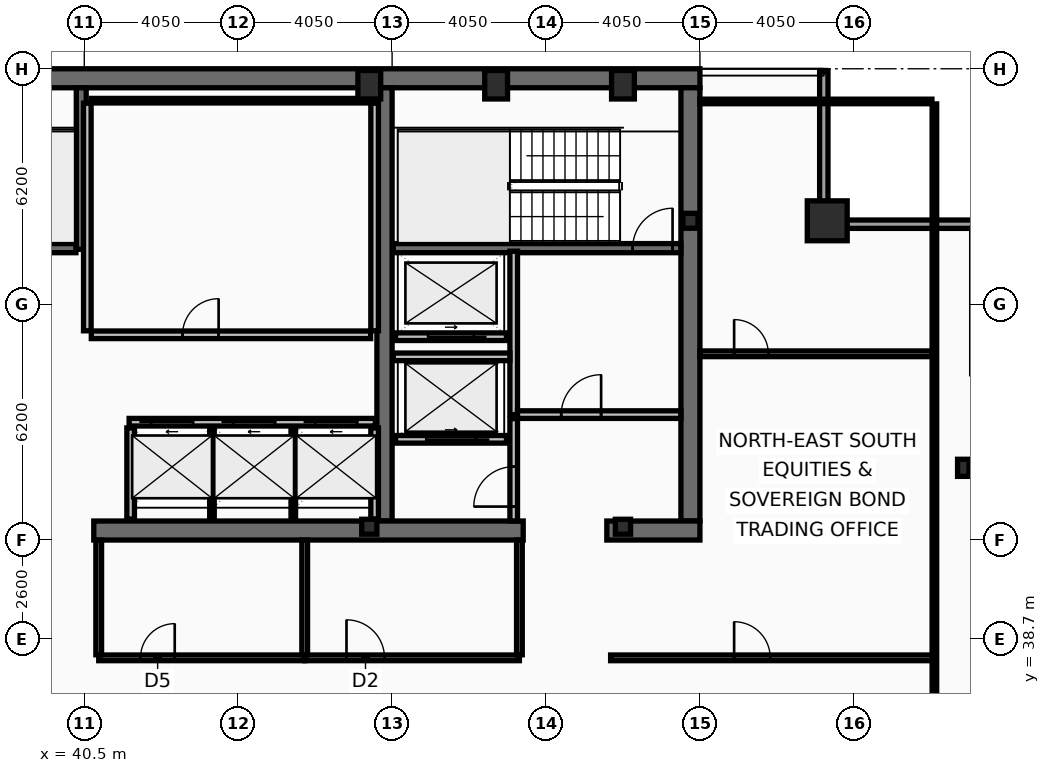
"""IFC4 building model, lengths in metres.
Left out: names, types, materials, properties, quantities, classifications, styles, units other than length and angle.
Written with IfcOpenShell. Run it as: python <this file> out.ifc"""

import sys

from ifc_helpers import new_model, si_unit, direction, frame, frame_2d, origin, origin_2d, place, context, subcontext, project, spatial, rectangle, hollow_rectangle, i_section, extrude, element, fill, save


model = new_model("IFC4")
c1 = context("Model", 3, precision=1e-05, world=origin(), true_north=direction((0.0, 1.0)))
c2 = subcontext(c1, "Body", "Model", "MODEL_VIEW")
j1 = project(units=[si_unit("LENGTHUNIT", "METRE"), si_unit("PLANEANGLEUNIT", "RADIAN")], contexts=[c1])
p1 = place(None, origin())
s1 = spatial("IfcSite", under=j1, at=p1, CompositionType="ELEMENT")
p2 = place(p1, origin())
s2 = spatial("IfcBuilding", under=s1, at=p2, CompositionType="ELEMENT")
p3 = place(p2, frame((0.0, 0.0, 284.2)))
s3 = spatial("IfcBuildingStorey", under=s2, at=p3, CompositionType="ELEMENT", Elevation=284.2)
p4 = place(p3, frame((16.2, 53.45, 0.0), z_axis=(0.0, 0.0, 1.0), x_axis=(1.0, 0.0, 0.0)))
e1 = element("IfcWall", 1, at=p4, inside=s3, PredefinedType="SHEAR", context=c2, shape_type="SweptSolid", body=[
    extrude(rectangle(XDim=40.5, YDim=0.5, at=frame_2d((20.25, 0.0))), origin(), (0.0, 0.0, 1.0), 3.44),
])
p5 = place(p3, frame((56.45, 53.2, 0.0), z_axis=(0.0, 0.0, 1.0), x_axis=(0.0, -1.0, 0.0)))
e2 = element("IfcWall", 2, at=p5, inside=s3, PredefinedType="SHEAR", context=c2, shape_type="SweptSolid", body=[
    extrude(rectangle(XDim=11.4, YDim=0.5, at=frame_2d((5.7, 0.0))), origin(), (0.0, 0.0, 1.0), 3.44),
])
p6 = place(p3, frame((48.4, 41.8, 0.0), z_axis=(0.0, 0.0, 1.0), x_axis=(0.0, 1.0, 0.0)))
e3 = element("IfcWall", 3, at=p6, inside=s3, PredefinedType="SHEAR", context=c2, shape_type="SweptSolid", body=[
    extrude(rectangle(XDim=11.4, YDim=0.4, at=frame_2d((5.7, 0.0))), origin(), (0.0, 0.0, 1.0), 3.44),
])
p7 = place(p3, frame((52.05, 41.55, 0.0), z_axis=(0.0, 0.0, 1.0), x_axis=(-1.0, 0.0, 0.0)))
e4 = element("IfcWall", 4, at=p7, inside=s3, PredefinedType="SHEAR", context=c2, shape_type="SweptSolid", body=[
    extrude(rectangle(XDim=11.3, YDim=0.5, at=frame_2d((5.65, 0.0))), origin(), (0.0, 0.0, 1.0), 3.44),
])
p8 = place(p3, frame((56.7, 41.55, 0.0), z_axis=(0.0, 0.0, 1.0), x_axis=(-1.0, 0.0, 0.0)))
e5 = element("IfcWall", 5, at=p8, inside=s3, PredefinedType="SHEAR", context=c2, shape_type="SweptSolid", body=[
    extrude(rectangle(XDim=2.45, YDim=0.5, at=frame_2d((1.225, 0.0))), origin(), (0.0, 0.0, 1.0), 3.44),
])
p9 = place(p3, frame((40.42, 48.95, 0.0), z_axis=(0.0, 0.0, 1.0), x_axis=(0.0, 1.0, 0.0)))
e6 = element("IfcWall", 6, at=p9, inside=s3, PredefinedType="SHEAR", context=c2, shape_type="SweptSolid", body=[
    extrude(rectangle(XDim=4.25, YDim=0.26, at=frame_2d((2.125, 0.0))), origin(), (0.0, 0.0, 1.0), 3.44),
])
p10 = place(p3, frame((48.63, 48.98, 0.0), z_axis=(0.0, 0.0, 1.0), x_axis=(1.0, 0.0, 0.0)))
e7 = element("IfcWall", 7, at=p10, inside=s3, PredefinedType="SHEAR", context=c2, shape_type="SweptSolid", body=[
    extrude(rectangle(XDim=7.57, YDim=0.24, at=frame_2d((3.785, 0.0))), origin(), (0.0, 0.0, 1.0), 3.44),
])
p11 = place(p10, frame((6.3, 0.0, 0.0)))
e8 = element("IfcOpeningElement", 8, at=p11, cuts=e7, PredefinedType="OPENING", context=c2, shape_type="SweptSolid", body=[
    extrude(rectangle(XDim=1.05, YDim=2.15, at=frame_2d((0.525, 1.075))), frame((0.0, 0.13, 0.0), z_axis=(0.0, -1.0, 0.0), x_axis=(1.0, 0.0, 0.0)), (0.0, 0.0, 1.0), 0.26),
])
p12 = place(p3, frame((32.72, 48.98, 0.0), z_axis=(0.0, 0.0, 1.0), x_axis=(1.0, 0.0, 0.0)))
e9 = element("IfcWall", 9, at=p12, inside=s3, PredefinedType="SHEAR", context=c2, shape_type="SweptSolid", body=[
    extrude(rectangle(XDim=7.56, YDim=0.24, at=frame_2d((3.78, 0.0))), origin(), (0.0, 0.0, 1.0), 3.44),
])
p13 = place(p12, frame((0.22, 0.0, 0.0)))
e10 = element("IfcOpeningElement", 10, at=p13, cuts=e9, PredefinedType="OPENING", context=c2, shape_type="SweptSolid", body=[
    extrude(rectangle(XDim=1.05, YDim=2.15, at=frame_2d((0.525, 1.075))), frame((0.0, 0.13, 0.0), z_axis=(0.0, -1.0, 0.0), x_axis=(1.0, 0.0, 0.0)), (0.0, 0.0, 1.0), 0.26),
])
p14 = place(p3, frame((60.05, 49.7, 0.0), z_axis=(0.0, 0.0, 1.0), x_axis=(1.0, 0.0, 0.0)))
e11 = element("IfcColumn", 11, at=p14, inside=s3, PredefinedType="COLUMN", context=c2, shape_type="SweptSolid", body=[
    extrude(hollow_rectangle(XDim=1.05, YDim=1.05, WallThickness=0.055, at=origin_2d()), origin(), (0.0, 0.0, 1.0), 3.6),
])
for number, where, z_axis, x_axis in (
    (12, (48.0, 53.28, 0.0), (0.0, 0.0, 1.0), (1.0, 0.0, 0.0)),
    (13, (51.337, 53.28, 0.0), (0.0, 0.0, 1.0), (1.0, 0.0, 0.0)),
    (14, (54.675, 53.28, 0.0), (0.0, 0.0, 1.0), (1.0, 0.0, 0.0)),
):
    element("IfcColumn", number, at=place(p3, frame(where, z_axis=z_axis, x_axis=x_axis)), inside=s3, PredefinedType="COLUMN", context=c2, shape_type="SweptSolid", body=[
        extrude(hollow_rectangle(XDim=0.6, YDim=0.75, WallThickness=0.045, at=origin_2d()), origin(), (0.0, 0.0, 1.0), 3.6),
    ])
p15 = place(p3, frame((63.63, 43.2, 0.0), z_axis=(0.0, 0.0, 1.0), x_axis=(1.0, 0.0, 0.0)))
e15 = element("IfcColumn", 15, at=p15, inside=s3, PredefinedType="COLUMN", context=c2, shape_type="SweptSolid", body=[
    extrude(i_section(OverallWidth=0.3, OverallDepth=0.45, WebThickness=0.014, FlangeThickness=0.026, at=origin_2d()), origin(), (0.0, 0.0, 1.0), 3.6),
])
for number, where, z_axis, x_axis in (
    (16, (56.45, 49.7, 0.0), (0.0, 0.0, 1.0), (1.0, 0.0, 0.0)),
    (17, (48.0, 41.65, 0.0), (0.0, 0.0, 1.0), (1.0, 0.0, 0.0)),
    (18, (54.675, 41.65, 0.0), (0.0, 0.0, 1.0), (1.0, 0.0, 0.0)),
):
    element("IfcColumn", number, at=place(p3, frame(where, z_axis=z_axis, x_axis=x_axis)), inside=s3, PredefinedType="COLUMN", context=c2, shape_type="SweptSolid", body=[
        extrude(i_section(OverallWidth=0.399, OverallDepth=0.393, WebThickness=0.023, FlangeThickness=0.037, at=origin_2d()), origin(), (0.0, 0.0, 1.0), 3.6),
    ])
p16 = place(p3, frame((59.96, 53.63, 0.0), z_axis=(0.0, 0.0, 1.0), x_axis=(0.0, -1.0, 0.0)))
e19 = element("IfcWall", 19, at=p16, inside=s3, PredefinedType="SOLIDWALL", context=c2, shape_type="SweptSolid", body=[
    extrude(rectangle(XDim=3.91, YDim=0.22, at=frame_2d((1.955, 0.0))), origin(), (0.0, 0.0, 1.0), 2.88),
])
p17 = place(p3, frame((59.85, 49.61, 0.0), z_axis=(0.0, 0.0, 1.0), x_axis=(1.0, 0.0, 0.0)))
e20 = element("IfcWall", 20, at=p17, inside=s3, PredefinedType="SOLIDWALL", context=c2, shape_type="SweptSolid", body=[
    extrude(rectangle(XDim=4.22, YDim=0.22, at=frame_2d((2.11, 0.0))), origin(), (0.0, 0.0, 1.0), 2.88),
])
p18 = place(p3, frame((41.68, 44.4, 0.0), z_axis=(0.0, 0.0, 1.0), x_axis=(1.0, 0.0, 0.0)))
e21 = element("IfcWall", 21, at=p18, inside=s3, PredefinedType="PARTITIONING", context=c2, shape_type="SweptSolid", body=[
    extrude(rectangle(XDim=6.48, YDim=0.2, at=frame_2d((3.24, 0.0))), origin(), (0.0, 0.0, 1.0), 3.44),
])
p19 = place(p18, frame((0.58, 0.0, 0.0)))
e22 = element("IfcOpeningElement", 22, at=p19, cuts=e21, PredefinedType="OPENING", context=c2, shape_type="SweptSolid", body=[
    extrude(rectangle(XDim=1.1, YDim=2.18, at=frame_2d((0.55, 1.09))), frame((0.0, 0.11, 0.0), z_axis=(0.0, -1.0, 0.0), x_axis=(1.0, 0.0, 0.0)), (0.0, 0.0, 1.0), 0.22),
])
p20 = place(p18, frame((2.74, 0.0, 0.0)))
e23 = element("IfcOpeningElement", 23, at=p20, cuts=e21, PredefinedType="OPENING", context=c2, shape_type="SweptSolid", body=[
    extrude(rectangle(XDim=1.1, YDim=2.18, at=frame_2d((0.55, 1.09))), frame((0.0, 0.11, 0.0), z_axis=(0.0, -1.0, 0.0), x_axis=(1.0, 0.0, 0.0)), (0.0, 0.0, 1.0), 0.22),
])
p21 = place(p18, frame((4.9, 0.0, 0.0)))
e24 = element("IfcOpeningElement", 24, at=p21, cuts=e21, PredefinedType="OPENING", context=c2, shape_type="SweptSolid", body=[
    extrude(rectangle(XDim=1.1, YDim=2.18, at=frame_2d((0.55, 1.09))), frame((0.0, 0.11, 0.0), z_axis=(0.0, -1.0, 0.0), x_axis=(1.0, 0.0, 0.0)), (0.0, 0.0, 1.0), 0.22),
])
p22 = place(p3, frame((51.61, 43.95, 0.0), z_axis=(0.0, 0.0, 1.0), x_axis=(-1.0, 0.0, 0.0)))
e25 = element("IfcWall", 25, at=p22, inside=s3, PredefinedType="PARTITIONING", context=c2, shape_type="SweptSolid", body=[
    extrude(rectangle(XDim=2.92, YDim=0.2, at=frame_2d((1.46, 0.0))), origin(), (0.0, 0.0, 1.0), 3.44),
])
p23 = place(p22, frame((0.81, 0.0, 0.0)))
e26 = element("IfcOpeningElement", 26, at=p23, cuts=e25, PredefinedType="OPENING", context=c2, shape_type="SweptSolid", body=[
    extrude(rectangle(XDim=1.3, YDim=2.18, at=frame_2d((0.65, 1.09))), frame((0.0, 0.11, 0.0), z_axis=(0.0, -1.0, 0.0), x_axis=(1.0, 0.0, 0.0)), (0.0, 0.0, 1.0), 0.22),
])
p24 = place(p3, frame((51.61, 46.65, 0.0), z_axis=(0.0, 0.0, 1.0), x_axis=(-1.0, 0.0, 0.0)))
e27 = element("IfcWall", 27, at=p24, inside=s3, PredefinedType="PARTITIONING", context=c2, shape_type="SweptSolid", body=[
    extrude(rectangle(XDim=2.92, YDim=0.2, at=frame_2d((1.46, 0.0))), origin(), (0.0, 0.0, 1.0), 3.44),
])
p25 = place(p24, frame((0.86, 0.0, 0.0)))
e28 = element("IfcOpeningElement", 28, at=p25, cuts=e27, PredefinedType="OPENING", context=c2, shape_type="SweptSolid", body=[
    extrude(rectangle(XDim=1.2, YDim=2.18, at=frame_2d((0.6, 1.09))), frame((0.0, 0.11, 0.0), z_axis=(0.0, -1.0, 0.0), x_axis=(1.0, 0.0, 0.0)), (0.0, 0.0, 1.0), 0.22),
])
p26 = place(p3, frame((51.8, 44.6, 0.0), z_axis=(0.0, 0.0, 1.0), x_axis=(0.0, 1.0, 0.0)))
e29 = element("IfcWall", 29, at=p26, inside=s3, PredefinedType="PARTITIONING", context=c2, shape_type="SweptSolid", body=[
    extrude(rectangle(XDim=4.3, YDim=0.2, at=frame_2d((2.15, 0.0))), origin(), (0.0, 0.0, 1.0), 3.44),
])
p27 = place(p3, frame((51.9, 44.6, 0.0), z_axis=(0.0, 0.0, 1.0), x_axis=(1.0, 0.0, 0.0)))
e30 = element("IfcWall", 30, at=p27, inside=s3, PredefinedType="PARTITIONING", context=c2, shape_type="SweptSolid", body=[
    extrude(rectangle(XDim=4.3, YDim=0.2, at=frame_2d((2.15, 0.0))), origin(), (0.0, 0.0, 1.0), 3.44),
])
p28 = place(p27, frame((1.15, 0.0, 0.0)))
e31 = element("IfcOpeningElement", 31, at=p28, cuts=e30, PredefinedType="OPENING", context=c2, shape_type="SweptSolid", body=[
    extrude(rectangle(XDim=1.05, YDim=2.15, at=frame_2d((0.525, 1.075))), frame((0.0, 0.11, 0.0), z_axis=(0.0, -1.0, 0.0), x_axis=(1.0, 0.0, 0.0)), (0.0, 0.0, 1.0), 0.22),
])
p29 = place(p3, frame((48.63, 46.12, 0.0), z_axis=(0.0, 0.0, 1.0), x_axis=(1.0, 0.0, 0.0)))
e32 = element("IfcWall", 32, at=p29, inside=s3, PredefinedType="PARTITIONING", context=c2, shape_type="SweptSolid", body=[
    extrude(rectangle(XDim=3.07, YDim=0.2, at=frame_2d((1.535, 0.0))), origin(), (0.0, 0.0, 1.0), 3.44),
])
p30 = place(p3, frame((51.8, 41.8, 0.0), z_axis=(0.0, 0.0, 1.0), x_axis=(0.0, 1.0, 0.0)))
e33 = element("IfcWall", 33, at=p30, inside=s3, PredefinedType="PARTITIONING", context=c2, shape_type="SweptSolid", body=[
    extrude(rectangle(XDim=2.695, YDim=0.2, at=frame_2d((1.348, 0.0))), origin(), (0.0, 0.0, 1.0), 3.44),
])
p31 = place(p30, frame((0.38, 0.0, 0.0)))
e34 = element("IfcOpeningElement", 34, at=p31, cuts=e33, PredefinedType="OPENING", context=c2, shape_type="SweptSolid", body=[
    extrude(rectangle(XDim=1.05, YDim=2.15, at=frame_2d((0.525, 1.075))), frame((0.0, 0.11, 0.0), z_axis=(0.0, -1.0, 0.0), x_axis=(1.0, 0.0, 0.0)), (0.0, 0.0, 1.0), 0.22),
])
for number, where, z_axis, x_axis in (
    (35, (40.58, 46.805, 0.0), (0.0, 0.0, 1.0), (0.0, 1.0, 0.0)),
    (36, (48.14, 46.805, 0.0), (0.0, 0.0, 1.0), (0.0, 1.0, 0.0)),
):
    element("IfcWall", number, at=place(p3, frame(where, z_axis=z_axis, x_axis=x_axis)), inside=s3, PredefinedType="PARTITIONING", context=c2, shape_type="SweptSolid", body=[
        extrude(rectangle(XDim=5.99, YDim=0.2, at=frame_2d((2.995, 0.0))), origin(), (0.0, 0.0, 1.0), 3.44),
    ])
p32 = place(p3, frame((40.685, 52.86, 0.0), z_axis=(0.0, 0.0, 1.0), x_axis=(1.0, 0.0, 0.0)))
e37 = element("IfcWall", 37, at=p32, inside=s3, PredefinedType="PARTITIONING", context=c2, shape_type="SweptSolid", body=[
    extrude(rectangle(XDim=7.35, YDim=0.12, at=frame_2d((3.675, 0.0))), origin(), (0.0, 0.0, 1.0), 3.44),
])
p33 = place(p3, frame((40.685, 46.7, 0.0), z_axis=(0.0, 0.0, 1.0), x_axis=(1.0, 0.0, 0.0)))
e38 = element("IfcWall", 38, at=p33, inside=s3, PredefinedType="PARTITIONING", context=c2, shape_type="SweptSolid", body=[
    extrude(rectangle(XDim=7.35, YDim=0.2, at=frame_2d((3.675, 0.0))), origin(), (0.0, 0.0, 1.0), 3.44),
])
p34 = place(p33, frame((2.4, 0.0, 0.0)))
e39 = element("IfcOpeningElement", 39, at=p34, cuts=e38, PredefinedType="OPENING", context=c2, shape_type="SweptSolid", body=[
    extrude(rectangle(XDim=0.95, YDim=2.1, at=frame_2d((0.475, 1.05))), frame((0.0, 0.11, 0.0), z_axis=(0.0, -1.0, 0.0), x_axis=(1.0, 0.0, 0.0)), (0.0, 0.0, 1.0), 0.22),
])
for number, where, z_axis, x_axis in (
    (40, (41.72, 41.85, 0.0), (0.0, 0.0, 1.0), (0.0, 1.0, 0.0)),
    (41, (48.14, 41.85, 0.0), (0.0, 0.0, 1.0), (0.0, 1.0, 0.0)),
):
    element("IfcWall", number, at=place(p3, frame(where, z_axis=z_axis, x_axis=x_axis)), inside=s3, PredefinedType="PARTITIONING", context=c2, shape_type="SweptSolid", body=[
        extrude(rectangle(XDim=2.4, YDim=0.2, at=frame_2d((1.2, 0.0))), origin(), (0.0, 0.0, 1.0), 3.44),
    ])
for number, where, z_axis, x_axis in (
    (42, (43.86, 41.85, 0.0), (0.0, 0.0, 1.0), (0.0, 1.0, 0.0)),
    (43, (46.0, 41.85, 0.0), (0.0, 0.0, 1.0), (0.0, 1.0, 0.0)),
):
    element("IfcWall", number, at=place(p3, frame(where, z_axis=z_axis, x_axis=x_axis)), inside=s3, PredefinedType="PARTITIONING", context=c2, shape_type="SweptSolid", body=[
        extrude(rectangle(XDim=2.4, YDim=0.12, at=frame_2d((1.2, 0.0))), origin(), (0.0, 0.0, 1.0), 3.44),
    ])
p35 = place(p3, frame((40.88, 38.2, 0.0), z_axis=(0.0, 0.0, 1.0), x_axis=(1.0, 0.0, 0.0)))
e44 = element("IfcWall", 44, at=p35, inside=s3, PredefinedType="PARTITIONING", context=c2, shape_type="SweptSolid", body=[
    extrude(rectangle(XDim=5.42, YDim=0.15, at=frame_2d((2.71, 0.0))), origin(), (0.0, 0.0, 1.0), 2.78),
])
p36 = place(p35, frame((1.1, 0.0, 0.0)))
e45 = element("IfcOpeningElement", 45, at=p36, cuts=e44, PredefinedType="OPENING", context=c2, shape_type="SweptSolid", body=[
    extrude(rectangle(XDim=0.9, YDim=2.05, at=frame_2d((0.45, 1.025))), frame((0.0, 0.085, 0.0), z_axis=(0.0, -1.0, 0.0), x_axis=(1.0, 0.0, 0.0)), (0.0, 0.0, 1.0), 0.17),
])
p37 = place(p3, frame((46.3, 38.2, 0.0), z_axis=(0.0, 0.0, 1.0), x_axis=(1.0, 0.0, 0.0)))
e46 = element("IfcWall", 46, at=p37, inside=s3, PredefinedType="PARTITIONING", context=c2, shape_type="SweptSolid", body=[
    extrude(rectangle(XDim=5.65, YDim=0.15, at=frame_2d((2.825, 0.0))), origin(), (0.0, 0.0, 1.0), 2.78),
])
p38 = place(p37, frame((1.1, 0.0, 0.0)))
e47 = element("IfcOpeningElement", 47, at=p38, cuts=e46, PredefinedType="OPENING", context=c2, shape_type="SweptSolid", body=[
    extrude(rectangle(XDim=1.0, YDim=2.05, at=frame_2d((0.5, 1.025))), frame((0.0, 0.085, 0.0), z_axis=(0.0, -1.0, 0.0), x_axis=(1.0, 0.0, 0.0)), (0.0, 0.0, 1.0), 0.17),
])
for number, where, z_axis, x_axis in (
    (48, (40.88, 38.28, 0.0), (0.0, 0.0, 1.0), (0.0, 1.0, 0.0)),
    (49, (46.3, 38.28, 0.0), (0.0, 0.0, 1.0), (0.0, 1.0, 0.0)),
    (50, (51.95, 38.28, 0.0), (0.0, 0.0, 1.0), (0.0, 1.0, 0.0)),
):
    element("IfcWall", number, at=place(p3, frame(where, z_axis=z_axis, x_axis=x_axis)), inside=s3, PredefinedType="PARTITIONING", context=c2, shape_type="SweptSolid", body=[
        extrude(rectangle(XDim=3.02, YDim=0.15, at=frame_2d((1.51, 0.0))), origin(), (0.0, 0.0, 1.0), 3.44),
    ])
p39 = place(p3, frame((54.35, 38.2, 0.0), z_axis=(0.0, 0.0, 1.0), x_axis=(1.0, 0.0, 0.0)))
e51 = element("IfcWall", 51, at=p39, inside=s3, PredefinedType="PARTITIONING", context=c2, shape_type="SweptSolid", body=[
    extrude(rectangle(XDim=8.52, YDim=0.15, at=frame_2d((4.26, 0.0))), origin(), (0.0, 0.0, 1.0), 2.78),
])
p40 = place(p39, frame((3.25, 0.0, 0.0)))
e52 = element("IfcOpeningElement", 52, at=p40, cuts=e51, PredefinedType="OPENING", context=c2, shape_type="SweptSolid", body=[
    extrude(rectangle(XDim=0.95, YDim=2.05, at=frame_2d((0.475, 1.025))), frame((0.0, 0.085, 0.0), z_axis=(0.0, -1.0, 0.0), x_axis=(1.0, 0.0, 0.0)), (0.0, 0.0, 1.0), 0.17),
])
p41 = place(p3, frame((56.7, 46.2, 0.0), z_axis=(0.0, 0.0, 1.0), x_axis=(1.0, 0.0, 0.0)))
e53 = element("IfcWall", 53, at=p41, inside=s3, PredefinedType="PARTITIONING", context=c2, shape_type="SweptSolid", body=[
    extrude(rectangle(XDim=6.105, YDim=0.15, at=frame_2d((3.052, 0.0))), origin(), (0.0, 0.0, 1.0), 2.88),
])
p42 = place(p41, frame((0.9, 0.0, 0.0)))
e54 = element("IfcOpeningElement", 54, at=p42, cuts=e53, PredefinedType="OPENING", context=c2, shape_type="SweptSolid", body=[
    extrude(rectangle(XDim=0.9, YDim=2.05, at=frame_2d((0.45, 1.025))), frame((0.0, 0.085, 0.0), z_axis=(0.0, -1.0, 0.0), x_axis=(1.0, 0.0, 0.0)), (0.0, 0.0, 1.0), 0.17),
])
p43 = place(p3, frame((62.87, 10.665, 0.0), z_axis=(0.0, 0.0, 1.0), x_axis=(0.0, 1.0, 0.0)))
e55 = element("IfcWall", 55, at=p43, inside=s3, PredefinedType="PARTITIONING", context=c2, shape_type="SweptSolid", body=[
    extrude(rectangle(XDim=42.11, YDim=0.12, at=frame_2d((21.055, 0.0))), origin(), (0.0, 0.0, 1.0), 2.78),
])
p44 = place(p3, frame((56.7, 52.84, 0.0), z_axis=(0.0, 0.0, 1.0), x_axis=(1.0, 0.0, 0.0)))
e56 = element("IfcWall", 56, at=p44, inside=s3, PredefinedType="PARTITIONING", context=c2, shape_type="SweptSolid", body=[
    extrude(rectangle(XDim=6.105, YDim=0.12, at=frame_2d((3.052, 0.0))), origin(), (0.0, 0.0, 1.0), 3.44),
])
p45 = place(p11, origin())
e57 = element("IfcDoor", 57, at=p45, inside=s3, OperationType="SINGLE_SWING_RIGHT", PredefinedType="DOOR", context=c2, shape_type="SweptSolid", body=[
    extrude(rectangle(XDim=1.05, YDim=2.15, at=frame_2d((0.525, 1.075))), frame((0.0, 0.025, 0.0), z_axis=(0.0, -1.0, 0.0), x_axis=(1.0, 0.0, 0.0)), (0.0, 0.0, 1.0), 0.05),
])
fill(e8, e57)
p46 = place(p19, origin())
e58 = element("IfcDoor", 58, at=p46, inside=s3, OperationType="SLIDING_TO_LEFT", PredefinedType="DOOR", context=c2, shape_type="SweptSolid", body=[
    extrude(rectangle(XDim=1.1, YDim=2.18, at=frame_2d((0.55, 1.09))), frame((0.0, 0.025, 0.0), z_axis=(0.0, -1.0, 0.0), x_axis=(1.0, 0.0, 0.0)), (0.0, 0.0, 1.0), 0.05),
])
fill(e22, e58)
p47 = place(p20, origin())
e59 = element("IfcDoor", 59, at=p47, inside=s3, OperationType="SLIDING_TO_LEFT", PredefinedType="DOOR", context=c2, shape_type="SweptSolid", body=[
    extrude(rectangle(XDim=1.1, YDim=2.18, at=frame_2d((0.55, 1.09))), frame((0.0, 0.025, 0.0), z_axis=(0.0, -1.0, 0.0), x_axis=(1.0, 0.0, 0.0)), (0.0, 0.0, 1.0), 0.05),
])
fill(e23, e59)
p48 = place(p21, origin())
e60 = element("IfcDoor", 60, at=p48, inside=s3, OperationType="SLIDING_TO_LEFT", PredefinedType="DOOR", context=c2, shape_type="SweptSolid", body=[
    extrude(rectangle(XDim=1.1, YDim=2.18, at=frame_2d((0.55, 1.09))), frame((0.0, 0.025, 0.0), z_axis=(0.0, -1.0, 0.0), x_axis=(1.0, 0.0, 0.0)), (0.0, 0.0, 1.0), 0.05),
])
fill(e24, e60)
p49 = place(p23, origin())
e61 = element("IfcDoor", 61, at=p49, inside=s3, OperationType="SLIDING_TO_LEFT", PredefinedType="DOOR", context=c2, shape_type="SweptSolid", body=[
    extrude(rectangle(XDim=1.3, YDim=2.18, at=frame_2d((0.65, 1.09))), frame((0.0, 0.025, 0.0), z_axis=(0.0, -1.0, 0.0), x_axis=(1.0, 0.0, 0.0)), (0.0, 0.0, 1.0), 0.05),
])
fill(e26, e61)
p50 = place(p25, origin())
e62 = element("IfcDoor", 62, at=p50, inside=s3, OperationType="SLIDING_TO_LEFT", PredefinedType="DOOR", context=c2, shape_type="SweptSolid", body=[
    extrude(rectangle(XDim=1.2, YDim=2.18, at=frame_2d((0.6, 1.09))), frame((0.0, 0.025, 0.0), z_axis=(0.0, -1.0, 0.0), x_axis=(1.0, 0.0, 0.0)), (0.0, 0.0, 1.0), 0.05),
])
fill(e28, e62)
p51 = place(p28, origin())
e63 = element("IfcDoor", 63, at=p51, inside=s3, OperationType="SINGLE_SWING_RIGHT", PredefinedType="DOOR", context=c2, shape_type="SweptSolid", body=[
    extrude(rectangle(XDim=1.05, YDim=2.15, at=frame_2d((0.525, 1.075))), frame((0.0, 0.025, 0.0), z_axis=(0.0, -1.0, 0.0), x_axis=(1.0, 0.0, 0.0)), (0.0, 0.0, 1.0), 0.05),
])
fill(e31, e63)
p52 = place(p31, origin())
e64 = element("IfcDoor", 64, at=p52, inside=s3, OperationType="SINGLE_SWING_LEFT", PredefinedType="DOOR", context=c2, shape_type="SweptSolid", body=[
    extrude(rectangle(XDim=1.05, YDim=2.15, at=frame_2d((0.525, 1.075))), frame((0.0, 0.025, 0.0), z_axis=(0.0, -1.0, 0.0), x_axis=(1.0, 0.0, 0.0)), (0.0, 0.0, 1.0), 0.05),
])
fill(e34, e64)
p53 = place(p34, origin())
e65 = element("IfcDoor", 65, at=p53, inside=s3, OperationType="SINGLE_SWING_RIGHT", PredefinedType="DOOR", context=c2, shape_type="SweptSolid", body=[
    extrude(rectangle(XDim=0.95, YDim=2.1, at=frame_2d((0.475, 1.05))), frame((0.0, 0.025, 0.0), z_axis=(0.0, -1.0, 0.0), x_axis=(1.0, 0.0, 0.0)), (0.0, 0.0, 1.0), 0.05),
])
fill(e39, e65)
p54 = place(p36, origin())
e66 = element("IfcDoor", 66, at=p54, inside=s3, OperationType="SINGLE_SWING_RIGHT", PredefinedType="DOOR", context=c2, shape_type="SweptSolid", body=[
    extrude(rectangle(XDim=0.9, YDim=2.05, at=frame_2d((0.45, 1.025))), frame((0.0, 0.025, 0.0), z_axis=(0.0, -1.0, 0.0), x_axis=(1.0, 0.0, 0.0)), (0.0, 0.0, 1.0), 0.05),
])
fill(e45, e66)
p55 = place(p38, origin())
e67 = element("IfcDoor", 67, at=p55, inside=s3, OperationType="SINGLE_SWING_LEFT", PredefinedType="DOOR", context=c2, shape_type="SweptSolid", body=[
    extrude(rectangle(XDim=1.0, YDim=2.05, at=frame_2d((0.5, 1.025))), frame((0.0, 0.025, 0.0), z_axis=(0.0, -1.0, 0.0), x_axis=(1.0, 0.0, 0.0)), (0.0, 0.0, 1.0), 0.05),
])
fill(e47, e67)
p56 = place(p40, origin())
e68 = element("IfcDoor", 68, at=p56, inside=s3, OperationType="SINGLE_SWING_LEFT", PredefinedType="DOOR", context=c2, shape_type="SweptSolid", body=[
    extrude(rectangle(XDim=0.95, YDim=2.05, at=frame_2d((0.475, 1.025))), frame((0.0, 0.025, 0.0), z_axis=(0.0, -1.0, 0.0), x_axis=(1.0, 0.0, 0.0)), (0.0, 0.0, 1.0), 0.05),
])
fill(e52, e68)
p57 = place(p42, origin())
e69 = element("IfcDoor", 69, at=p57, inside=s3, OperationType="SINGLE_SWING_LEFT", PredefinedType="DOOR", context=c2, shape_type="SweptSolid", body=[
    extrude(rectangle(XDim=0.9, YDim=2.05, at=frame_2d((0.45, 1.025))), frame((0.0, 0.025, 0.0), z_axis=(0.0, -1.0, 0.0), x_axis=(1.0, 0.0, 0.0)), (0.0, 0.0, 1.0), 0.05),
])
fill(e54, e69)
save(model, sys.argv[1])
